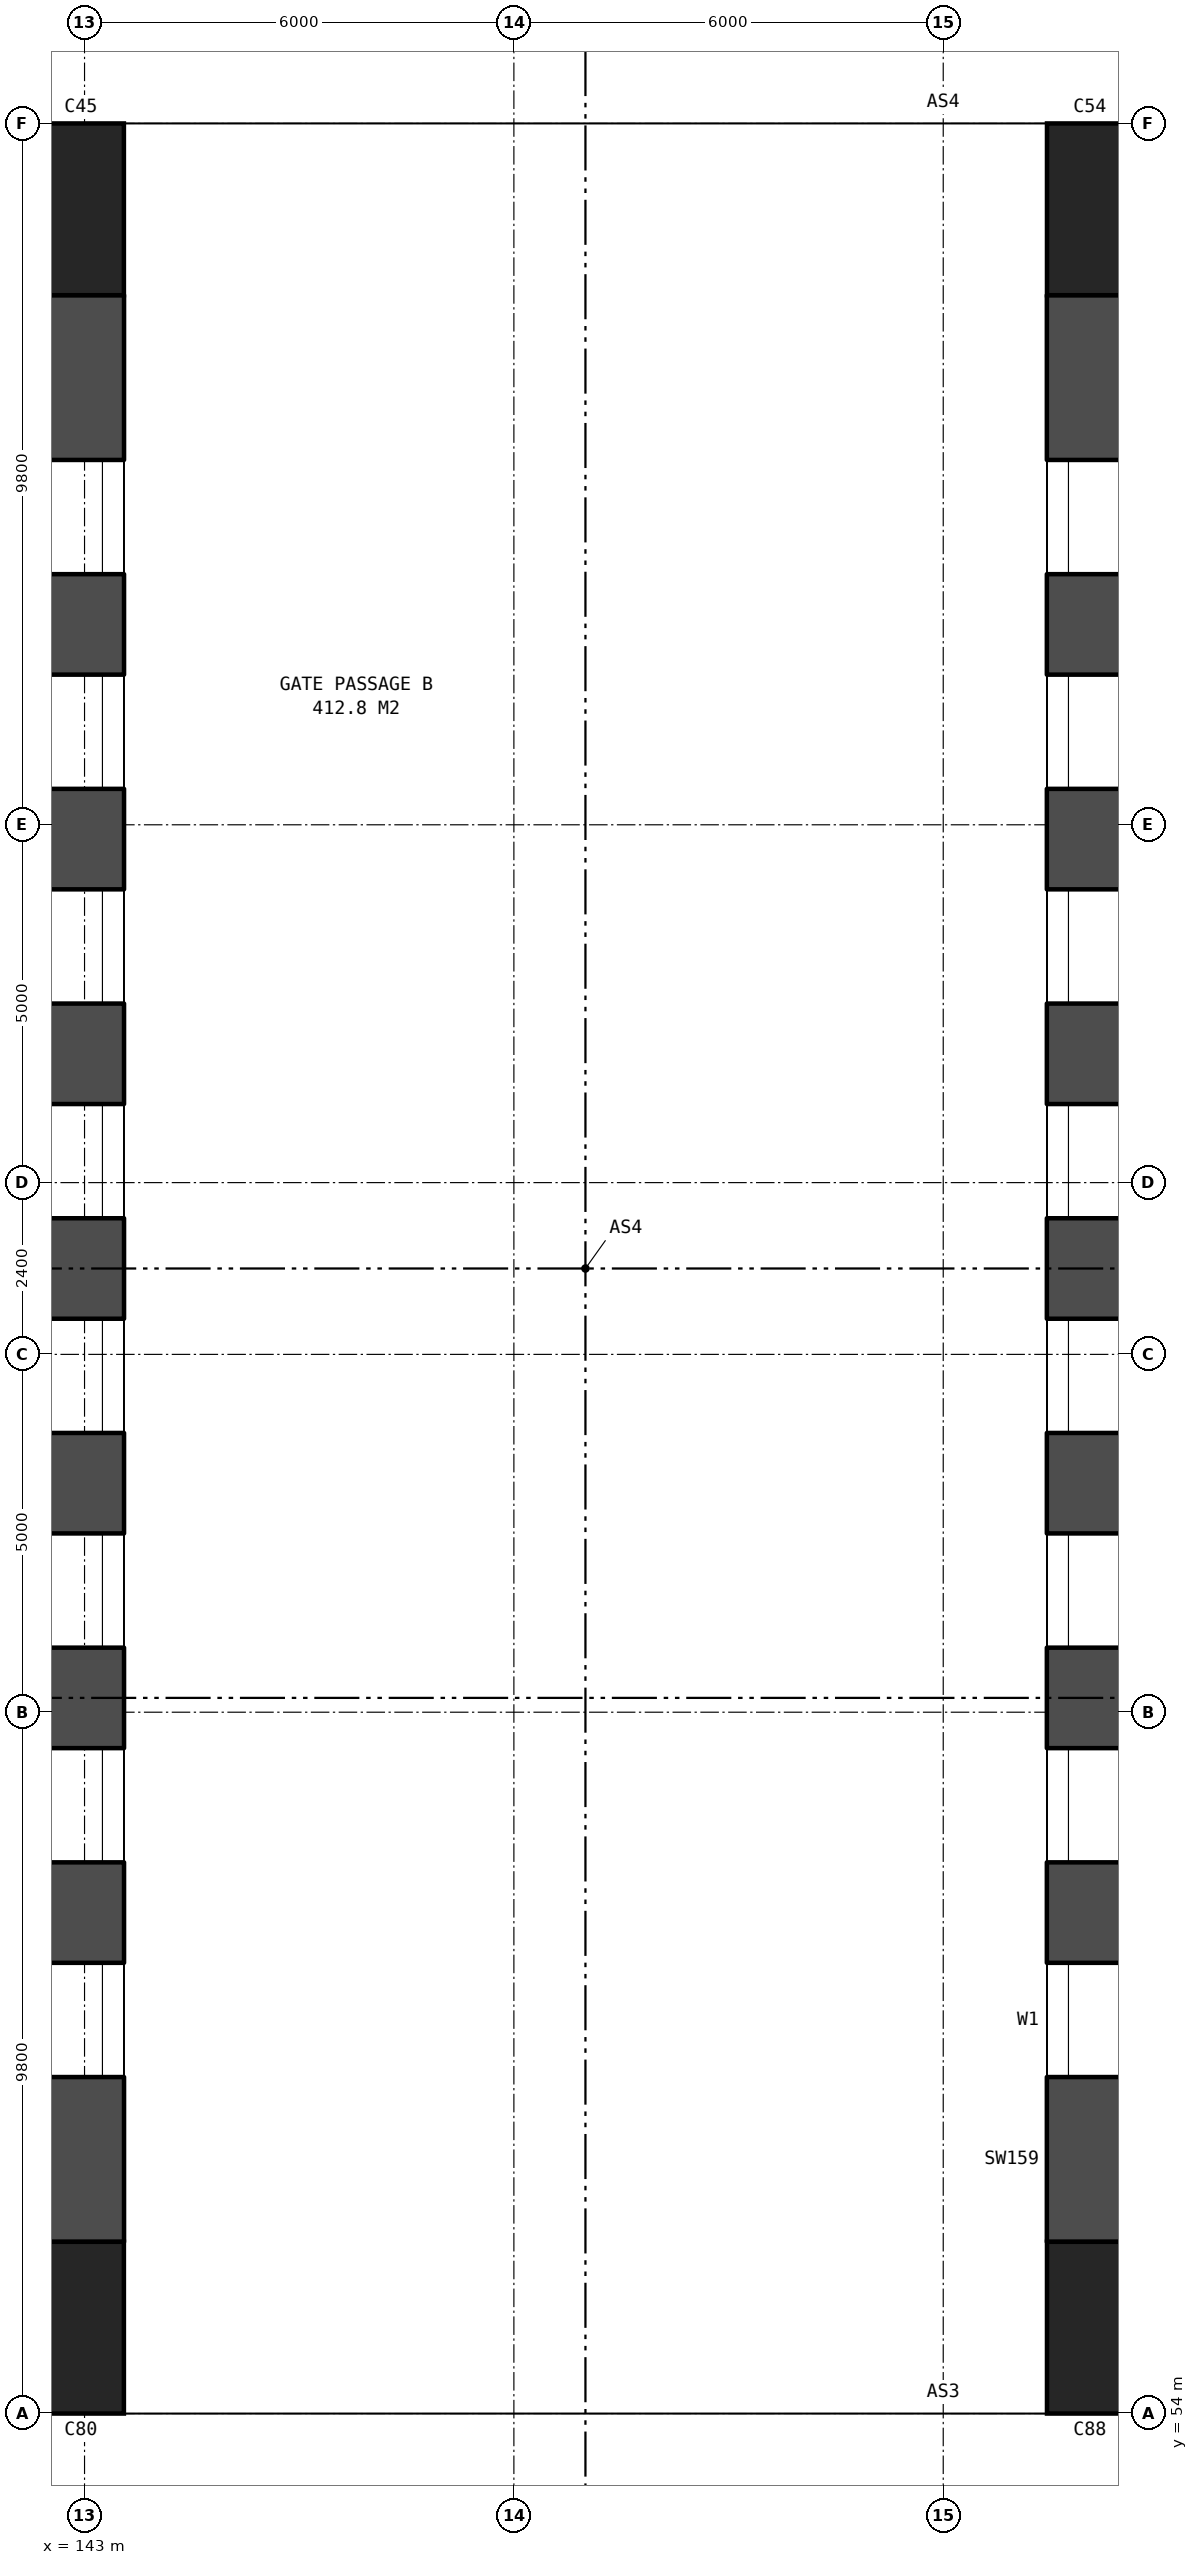
"""IFC4 building model, lengths in metres.
Left out: names, types, materials, properties, quantities, classifications, styles, units other than length and angle.
Written with IfcOpenShell. Run it as: python <this file> out.ifc"""

import sys

from ifc_helpers import new_model, si_unit, direction, frame, frame_2d, origin, origin_2d, place, context, subcontext, project, spatial, rectangle, extrude, element, fill, save


model = new_model("IFC4")
c1 = context("Model", 3, precision=1e-05, world=origin(), true_north=direction((0.0, 1.0)))
c2 = subcontext(c1, "Body", "Model", "MODEL_VIEW")
j1 = project(units=[si_unit("LENGTHUNIT", "METRE"), si_unit("PLANEANGLEUNIT", "RADIAN")], contexts=[c1])
p1 = place(None, origin())
s1 = spatial("IfcSite", under=j1, at=p1, CompositionType="ELEMENT")
p2 = place(p1, origin())
s2 = spatial("IfcBuilding", under=s1, at=p2, CompositionType="ELEMENT")
p3 = place(p2, origin())
s3 = spatial("IfcBuildingStorey", under=s2, at=p3, CompositionType="ELEMENT", Elevation=0.0)
for number, where, z_axis, x_axis in (
    (1, (142.95, 55.2, -0.35), (0.0, 0.0, 1.0), (1.0, 0.0, 0.0)),
    (2, (142.95, 84.8, -0.35), (0.0, 0.0, 1.0), (1.0, 0.0, 0.0)),
):
    element("IfcColumn", number, at=place(p3, frame(where, z_axis=z_axis, x_axis=x_axis)), inside=s3, PredefinedType="COLUMN", context=c2, shape_type="SweptSolid", body=[
        extrude(rectangle(XDim=1.2, YDim=2.4, at=origin_2d()), origin(), (0.0, 0.0, 1.0), 5.55),
    ])
p4 = place(p3, frame((142.95, 56.4, -0.35), z_axis=(0.0, 0.0, 1.0), x_axis=(0.0, 1.0, 0.0)))
e3 = element("IfcWall", 3, at=p4, inside=s3, PredefinedType="SHEAR", context=c2, shape_type="SweptSolid", body=[
    extrude(rectangle(XDim=27.2, YDim=1.2, at=frame_2d((13.6, 0.0))), origin(), (0.0, 0.0, 1.0), 5.55),
])
p5 = place(p4, frame((2.3, 0.0, 0.8)))
e4 = element("IfcOpeningElement", 4, at=p5, cuts=e3, PredefinedType="OPENING", context=c2, shape_type="SweptSolid", body=[
    extrude(rectangle(XDim=1.6, YDim=1.8, at=frame_2d((0.8, 0.9))), frame((0.0, 0.61, 0.0), z_axis=(0.0, -1.0, 0.0), x_axis=(1.0, 0.0, 0.0)), (0.0, 0.0, 1.0), 1.22),
])
p6 = place(p4, frame((5.3, 0.0, 0.8)))
e5 = element("IfcOpeningElement", 5, at=p6, cuts=e3, PredefinedType="OPENING", context=c2, shape_type="SweptSolid", body=[
    extrude(rectangle(XDim=1.6, YDim=1.8, at=frame_2d((0.8, 0.9))), frame((0.0, 0.61, 0.0), z_axis=(0.0, -1.0, 0.0), x_axis=(1.0, 0.0, 0.0)), (0.0, 0.0, 1.0), 1.22),
])
p7 = place(p4, frame((8.3, 0.0, 0.8)))
e6 = element("IfcOpeningElement", 6, at=p7, cuts=e3, PredefinedType="OPENING", context=c2, shape_type="SweptSolid", body=[
    extrude(rectangle(XDim=1.6, YDim=1.8, at=frame_2d((0.8, 0.9))), frame((0.0, 0.61, 0.0), z_axis=(0.0, -1.0, 0.0), x_axis=(1.0, 0.0, 0.0)), (0.0, 0.0, 1.0), 1.22),
])
p8 = place(p4, frame((11.3, 0.0, 0.8)))
e7 = element("IfcOpeningElement", 7, at=p8, cuts=e3, PredefinedType="OPENING", context=c2, shape_type="SweptSolid", body=[
    extrude(rectangle(XDim=1.6, YDim=1.8, at=frame_2d((0.8, 0.9))), frame((0.0, 0.61, 0.0), z_axis=(0.0, -1.0, 0.0), x_axis=(1.0, 0.0, 0.0)), (0.0, 0.0, 1.0), 1.22),
])
p9 = place(p4, frame((14.3, 0.0, 0.8)))
e8 = element("IfcOpeningElement", 8, at=p9, cuts=e3, PredefinedType="OPENING", context=c2, shape_type="SweptSolid", body=[
    extrude(rectangle(XDim=1.6, YDim=1.8, at=frame_2d((0.8, 0.9))), frame((0.0, 0.61, 0.0), z_axis=(0.0, -1.0, 0.0), x_axis=(1.0, 0.0, 0.0)), (0.0, 0.0, 1.0), 1.22),
])
p10 = place(p4, frame((17.3, 0.0, 0.8)))
e9 = element("IfcOpeningElement", 9, at=p10, cuts=e3, PredefinedType="OPENING", context=c2, shape_type="SweptSolid", body=[
    extrude(rectangle(XDim=1.6, YDim=1.8, at=frame_2d((0.8, 0.9))), frame((0.0, 0.61, 0.0), z_axis=(0.0, -1.0, 0.0), x_axis=(1.0, 0.0, 0.0)), (0.0, 0.0, 1.0), 1.22),
])
p11 = place(p4, frame((20.3, 0.0, 0.8)))
e10 = element("IfcOpeningElement", 10, at=p11, cuts=e3, PredefinedType="OPENING", context=c2, shape_type="SweptSolid", body=[
    extrude(rectangle(XDim=1.6, YDim=1.8, at=frame_2d((0.8, 0.9))), frame((0.0, 0.61, 0.0), z_axis=(0.0, -1.0, 0.0), x_axis=(1.0, 0.0, 0.0)), (0.0, 0.0, 1.0), 1.22),
])
p12 = place(p4, frame((23.3, 0.0, 0.8)))
e11 = element("IfcOpeningElement", 11, at=p12, cuts=e3, PredefinedType="OPENING", context=c2, shape_type="SweptSolid", body=[
    extrude(rectangle(XDim=1.6, YDim=1.8, at=frame_2d((0.8, 0.9))), frame((0.0, 0.61, 0.0), z_axis=(0.0, -1.0, 0.0), x_axis=(1.0, 0.0, 0.0)), (0.0, 0.0, 1.0), 1.22),
])
for number, where, z_axis, x_axis in (
    (12, (157.05, 55.2, -0.35), (0.0, 0.0, 1.0), (1.0, 0.0, 0.0)),
    (13, (157.05, 84.8, -0.35), (0.0, 0.0, 1.0), (1.0, 0.0, 0.0)),
):
    element("IfcColumn", number, at=place(p3, frame(where, z_axis=z_axis, x_axis=x_axis)), inside=s3, PredefinedType="COLUMN", context=c2, shape_type="SweptSolid", body=[
        extrude(rectangle(XDim=1.2, YDim=2.4, at=origin_2d()), origin(), (0.0, 0.0, 1.0), 5.55),
    ])
p13 = place(p3, frame((157.05, 56.4, -0.35), z_axis=(0.0, 0.0, 1.0), x_axis=(0.0, 1.0, 0.0)))
e14 = element("IfcWall", 14, at=p13, inside=s3, PredefinedType="SHEAR", context=c2, shape_type="SweptSolid", body=[
    extrude(rectangle(XDim=27.2, YDim=1.2, at=frame_2d((13.6, 0.0))), origin(), (0.0, 0.0, 1.0), 5.55),
])
p14 = place(p13, frame((2.3, 0.0, 0.8)))
e15 = element("IfcOpeningElement", 15, at=p14, cuts=e14, PredefinedType="OPENING", context=c2, shape_type="SweptSolid", body=[
    extrude(rectangle(XDim=1.6, YDim=1.8, at=frame_2d((0.8, 0.9))), frame((0.0, 0.61, 0.0), z_axis=(0.0, -1.0, 0.0), x_axis=(1.0, 0.0, 0.0)), (0.0, 0.0, 1.0), 1.22),
])
p15 = place(p13, frame((5.3, 0.0, 0.8)))
e16 = element("IfcOpeningElement", 16, at=p15, cuts=e14, PredefinedType="OPENING", context=c2, shape_type="SweptSolid", body=[
    extrude(rectangle(XDim=1.6, YDim=1.8, at=frame_2d((0.8, 0.9))), frame((0.0, 0.61, 0.0), z_axis=(0.0, -1.0, 0.0), x_axis=(1.0, 0.0, 0.0)), (0.0, 0.0, 1.0), 1.22),
])
p16 = place(p13, frame((8.3, 0.0, 0.8)))
e17 = element("IfcOpeningElement", 17, at=p16, cuts=e14, PredefinedType="OPENING", context=c2, shape_type="SweptSolid", body=[
    extrude(rectangle(XDim=1.6, YDim=1.8, at=frame_2d((0.8, 0.9))), frame((0.0, 0.61, 0.0), z_axis=(0.0, -1.0, 0.0), x_axis=(1.0, 0.0, 0.0)), (0.0, 0.0, 1.0), 1.22),
])
p17 = place(p13, frame((11.3, 0.0, 0.8)))
e18 = element("IfcOpeningElement", 18, at=p17, cuts=e14, PredefinedType="OPENING", context=c2, shape_type="SweptSolid", body=[
    extrude(rectangle(XDim=1.6, YDim=1.8, at=frame_2d((0.8, 0.9))), frame((0.0, 0.61, 0.0), z_axis=(0.0, -1.0, 0.0), x_axis=(1.0, 0.0, 0.0)), (0.0, 0.0, 1.0), 1.22),
])
p18 = place(p13, frame((14.3, 0.0, 0.8)))
e19 = element("IfcOpeningElement", 19, at=p18, cuts=e14, PredefinedType="OPENING", context=c2, shape_type="SweptSolid", body=[
    extrude(rectangle(XDim=1.6, YDim=1.8, at=frame_2d((0.8, 0.9))), frame((0.0, 0.61, 0.0), z_axis=(0.0, -1.0, 0.0), x_axis=(1.0, 0.0, 0.0)), (0.0, 0.0, 1.0), 1.22),
])
p19 = place(p13, frame((17.3, 0.0, 0.8)))
e20 = element("IfcOpeningElement", 20, at=p19, cuts=e14, PredefinedType="OPENING", context=c2, shape_type="SweptSolid", body=[
    extrude(rectangle(XDim=1.6, YDim=1.8, at=frame_2d((0.8, 0.9))), frame((0.0, 0.61, 0.0), z_axis=(0.0, -1.0, 0.0), x_axis=(1.0, 0.0, 0.0)), (0.0, 0.0, 1.0), 1.22),
])
p20 = place(p13, frame((20.3, 0.0, 0.8)))
e21 = element("IfcOpeningElement", 21, at=p20, cuts=e14, PredefinedType="OPENING", context=c2, shape_type="SweptSolid", body=[
    extrude(rectangle(XDim=1.6, YDim=1.8, at=frame_2d((0.8, 0.9))), frame((0.0, 0.61, 0.0), z_axis=(0.0, -1.0, 0.0), x_axis=(1.0, 0.0, 0.0)), (0.0, 0.0, 1.0), 1.22),
])
p21 = place(p13, frame((23.3, 0.0, 0.8)))
e22 = element("IfcOpeningElement", 22, at=p21, cuts=e14, PredefinedType="OPENING", context=c2, shape_type="SweptSolid", body=[
    extrude(rectangle(XDim=1.6, YDim=1.8, at=frame_2d((0.8, 0.9))), frame((0.0, 0.61, 0.0), z_axis=(0.0, -1.0, 0.0), x_axis=(1.0, 0.0, 0.0)), (0.0, 0.0, 1.0), 1.22),
])
p22 = place(p5, origin())
e23 = element("IfcWindow", 23, at=p22, inside=s3, PartitioningType="SINGLE_PANEL", PredefinedType="WINDOW", context=c2, shape_type="SweptSolid", body=[
    extrude(rectangle(XDim=1.6, YDim=1.8, at=frame_2d((0.8, 0.9))), frame((0.0, -0.27, 0.0), z_axis=(0.0, -1.0, 0.0), x_axis=(1.0, 0.0, 0.0)), (0.0, 0.0, 1.0), 0.06),
])
fill(e4, e23)
p23 = place(p6, origin())
e24 = element("IfcWindow", 24, at=p23, inside=s3, PartitioningType="SINGLE_PANEL", PredefinedType="WINDOW", context=c2, shape_type="SweptSolid", body=[
    extrude(rectangle(XDim=1.6, YDim=1.8, at=frame_2d((0.8, 0.9))), frame((0.0, -0.27, 0.0), z_axis=(0.0, -1.0, 0.0), x_axis=(1.0, 0.0, 0.0)), (0.0, 0.0, 1.0), 0.06),
])
fill(e5, e24)
p24 = place(p7, origin())
e25 = element("IfcWindow", 25, at=p24, inside=s3, PartitioningType="SINGLE_PANEL", PredefinedType="WINDOW", context=c2, shape_type="SweptSolid", body=[
    extrude(rectangle(XDim=1.6, YDim=1.8, at=frame_2d((0.8, 0.9))), frame((0.0, -0.27, 0.0), z_axis=(0.0, -1.0, 0.0), x_axis=(1.0, 0.0, 0.0)), (0.0, 0.0, 1.0), 0.06),
])
fill(e6, e25)
p25 = place(p8, origin())
e26 = element("IfcWindow", 26, at=p25, inside=s3, PartitioningType="SINGLE_PANEL", PredefinedType="WINDOW", context=c2, shape_type="SweptSolid", body=[
    extrude(rectangle(XDim=1.6, YDim=1.8, at=frame_2d((0.8, 0.9))), frame((0.0, -0.27, 0.0), z_axis=(0.0, -1.0, 0.0), x_axis=(1.0, 0.0, 0.0)), (0.0, 0.0, 1.0), 0.06),
])
fill(e7, e26)
p26 = place(p9, origin())
e27 = element("IfcWindow", 27, at=p26, inside=s3, PartitioningType="SINGLE_PANEL", PredefinedType="WINDOW", context=c2, shape_type="SweptSolid", body=[
    extrude(rectangle(XDim=1.6, YDim=1.8, at=frame_2d((0.8, 0.9))), frame((0.0, -0.27, 0.0), z_axis=(0.0, -1.0, 0.0), x_axis=(1.0, 0.0, 0.0)), (0.0, 0.0, 1.0), 0.06),
])
fill(e8, e27)
p27 = place(p10, origin())
e28 = element("IfcWindow", 28, at=p27, inside=s3, PartitioningType="SINGLE_PANEL", PredefinedType="WINDOW", context=c2, shape_type="SweptSolid", body=[
    extrude(rectangle(XDim=1.6, YDim=1.8, at=frame_2d((0.8, 0.9))), frame((0.0, -0.27, 0.0), z_axis=(0.0, -1.0, 0.0), x_axis=(1.0, 0.0, 0.0)), (0.0, 0.0, 1.0), 0.06),
])
fill(e9, e28)
p28 = place(p11, origin())
e29 = element("IfcWindow", 29, at=p28, inside=s3, PartitioningType="SINGLE_PANEL", PredefinedType="WINDOW", context=c2, shape_type="SweptSolid", body=[
    extrude(rectangle(XDim=1.6, YDim=1.8, at=frame_2d((0.8, 0.9))), frame((0.0, -0.27, 0.0), z_axis=(0.0, -1.0, 0.0), x_axis=(1.0, 0.0, 0.0)), (0.0, 0.0, 1.0), 0.06),
])
fill(e10, e29)
p29 = place(p12, origin())
e30 = element("IfcWindow", 30, at=p29, inside=s3, PartitioningType="SINGLE_PANEL", PredefinedType="WINDOW", context=c2, shape_type="SweptSolid", body=[
    extrude(rectangle(XDim=1.6, YDim=1.8, at=frame_2d((0.8, 0.9))), frame((0.0, -0.27, 0.0), z_axis=(0.0, -1.0, 0.0), x_axis=(1.0, 0.0, 0.0)), (0.0, 0.0, 1.0), 0.06),
])
fill(e11, e30)
p30 = place(p14, origin())
e31 = element("IfcWindow", 31, at=p30, inside=s3, PartitioningType="SINGLE_PANEL", PredefinedType="WINDOW", context=c2, shape_type="SweptSolid", body=[
    extrude(rectangle(XDim=1.6, YDim=1.8, at=frame_2d((0.8, 0.9))), frame((0.0, 0.33, 0.0), z_axis=(0.0, -1.0, 0.0), x_axis=(1.0, 0.0, 0.0)), (0.0, 0.0, 1.0), 0.06),
])
fill(e15, e31)
p31 = place(p15, origin())
e32 = element("IfcWindow", 32, at=p31, inside=s3, PartitioningType="SINGLE_PANEL", PredefinedType="WINDOW", context=c2, shape_type="SweptSolid", body=[
    extrude(rectangle(XDim=1.6, YDim=1.8, at=frame_2d((0.8, 0.9))), frame((0.0, 0.33, 0.0), z_axis=(0.0, -1.0, 0.0), x_axis=(1.0, 0.0, 0.0)), (0.0, 0.0, 1.0), 0.06),
])
fill(e16, e32)
p32 = place(p16, origin())
e33 = element("IfcWindow", 33, at=p32, inside=s3, PartitioningType="SINGLE_PANEL", PredefinedType="WINDOW", context=c2, shape_type="SweptSolid", body=[
    extrude(rectangle(XDim=1.6, YDim=1.8, at=frame_2d((0.8, 0.9))), frame((0.0, 0.33, 0.0), z_axis=(0.0, -1.0, 0.0), x_axis=(1.0, 0.0, 0.0)), (0.0, 0.0, 1.0), 0.06),
])
fill(e17, e33)
p33 = place(p17, origin())
e34 = element("IfcWindow", 34, at=p33, inside=s3, PartitioningType="SINGLE_PANEL", PredefinedType="WINDOW", context=c2, shape_type="SweptSolid", body=[
    extrude(rectangle(XDim=1.6, YDim=1.8, at=frame_2d((0.8, 0.9))), frame((0.0, 0.33, 0.0), z_axis=(0.0, -1.0, 0.0), x_axis=(1.0, 0.0, 0.0)), (0.0, 0.0, 1.0), 0.06),
])
fill(e18, e34)
p34 = place(p18, origin())
e35 = element("IfcWindow", 35, at=p34, inside=s3, PartitioningType="SINGLE_PANEL", PredefinedType="WINDOW", context=c2, shape_type="SweptSolid", body=[
    extrude(rectangle(XDim=1.6, YDim=1.8, at=frame_2d((0.8, 0.9))), frame((0.0, 0.33, 0.0), z_axis=(0.0, -1.0, 0.0), x_axis=(1.0, 0.0, 0.0)), (0.0, 0.0, 1.0), 0.06),
])
fill(e19, e35)
p35 = place(p19, origin())
e36 = element("IfcWindow", 36, at=p35, inside=s3, PartitioningType="SINGLE_PANEL", PredefinedType="WINDOW", context=c2, shape_type="SweptSolid", body=[
    extrude(rectangle(XDim=1.6, YDim=1.8, at=frame_2d((0.8, 0.9))), frame((0.0, 0.33, 0.0), z_axis=(0.0, -1.0, 0.0), x_axis=(1.0, 0.0, 0.0)), (0.0, 0.0, 1.0), 0.06),
])
fill(e20, e36)
p36 = place(p20, origin())
e37 = element("IfcWindow", 37, at=p36, inside=s3, PartitioningType="SINGLE_PANEL", PredefinedType="WINDOW", context=c2, shape_type="SweptSolid", body=[
    extrude(rectangle(XDim=1.6, YDim=1.8, at=frame_2d((0.8, 0.9))), frame((0.0, 0.33, 0.0), z_axis=(0.0, -1.0, 0.0), x_axis=(1.0, 0.0, 0.0)), (0.0, 0.0, 1.0), 0.06),
])
fill(e21, e37)
p37 = place(p21, origin())
e38 = element("IfcWindow", 38, at=p37, inside=s3, PartitioningType="SINGLE_PANEL", PredefinedType="WINDOW", context=c2, shape_type="SweptSolid", body=[
    extrude(rectangle(XDim=1.6, YDim=1.8, at=frame_2d((0.8, 0.9))), frame((0.0, 0.33, 0.0), z_axis=(0.0, -1.0, 0.0), x_axis=(1.0, 0.0, 0.0)), (0.0, 0.0, 1.0), 0.06),
])
fill(e22, e38)
save(model, sys.argv[1])
